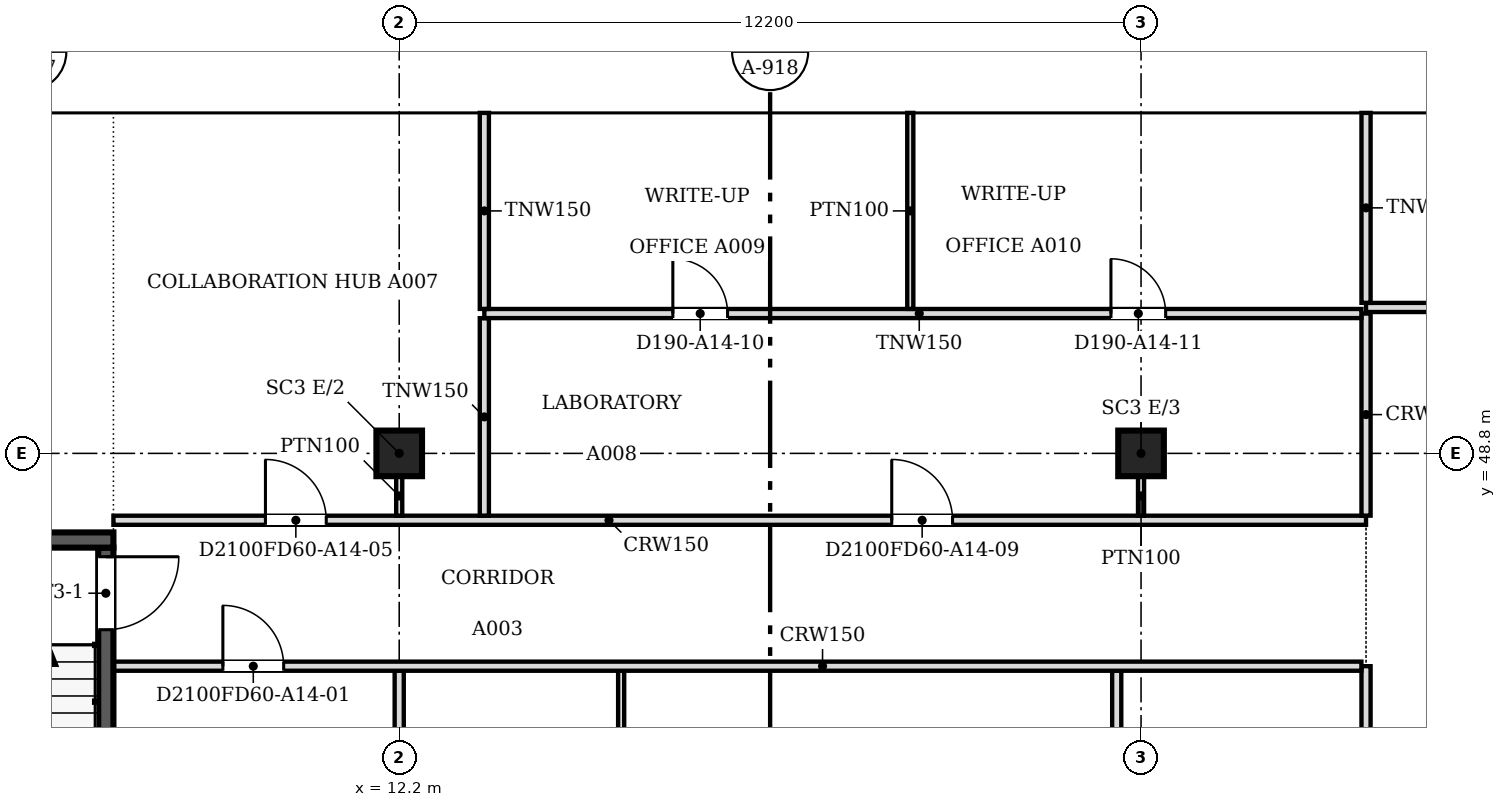
"""IFC4 building model, lengths in metres.
Left out: names, types, materials, properties, quantities, classifications, styles, units other than length and angle.
Written with IfcOpenShell. Run it as: python <this file> out.ifc"""

import sys

from ifc_helpers import new_model, si_unit, direction, frame, frame_2d, origin, origin_2d, place, context, subcontext, project, spatial, polyline, rectangle, outline, extrude, faceted_brep, source, transform, mapped, element, fill, save


model = new_model("IFC4")
c1 = context("Model", 3, precision=1e-05, world=origin(), true_north=direction((0.0, 1.0)))
c2 = subcontext(c1, "Body", "Model", "MODEL_VIEW")
j1 = project(units=[si_unit("LENGTHUNIT", "METRE"), si_unit("PLANEANGLEUNIT", "RADIAN")], contexts=[c1])
p1 = place(None, origin())
s1 = spatial("IfcSite", under=j1, at=p1, CompositionType="ELEMENT")
p2 = place(p1, origin())
s2 = spatial("IfcBuilding", under=s1, at=p2, CompositionType="ELEMENT")
p3 = place(p2, frame((0.0, 0.0, 159.2)))
s3 = spatial("IfcBuildingStorey", under=s2, at=p3, CompositionType="ELEMENT", Elevation=159.2)
for number, where, z_axis, x_axis in (
    (1, (12.2, 48.8, 0.0), (0.0, 0.0, 1.0), (1.0, 0.0, 0.0)),
    (2, (24.4, 48.8, 0.0), (0.0, 0.0, 1.0), (1.0, 0.0, 0.0)),
):
    element("IfcColumn", number, at=place(p3, frame(where, z_axis=z_axis, x_axis=x_axis)), inside=s3, PredefinedType="COLUMN", context=c2, shape_type="SweptSolid", body=[
        extrude(rectangle(XDim=0.75, YDim=0.75, at=origin_2d()), origin(), (0.0, 0.0, 1.0), 3.6),
    ])
m1 = source(origin(), c2, "Body", "SweptSolid", [
    extrude(outline(polyline([(3.05, 0.0), (6.1, 3.8), (3.05, 7.6), (0.0, 3.8), (3.05, 0.0)])), frame((0.0, 0.25, 0.0), z_axis=(0.0, -1.0, 0.0), x_axis=(1.0, 0.0, 0.0)), (0.0, 0.0, 1.0), 0.5),
])
p4 = place(p3, frame((30.5, 54.65, -3.8), z_axis=(0.0, 0.0, 1.0), x_axis=(-1.0, 0.0, 0.0)))
e3 = element("IfcWall", 3, at=p4, inside=s3, PredefinedType="SOLIDWALL", context=c2, shape_type="MappedRepresentation", body=[
    mapped(m1, transform((0.0, 0.0, 0.0), scale=1.0)),
])
m2 = source(origin(), c2, "Body", "SweptSolid", [
    extrude(outline(polyline([(3.05, 0.399), (5.78, 3.8), (3.05, 7.201), (0.321, 3.8), (3.05, 0.399)])), frame((0.0, 0.26, 0.0), z_axis=(0.0, -1.0, 0.0), x_axis=(1.0, 0.0, 0.0)), (0.0, 0.0, 1.0), 0.52),
])
p5 = place(p4, origin())
e4 = element("IfcOpeningElement", 4, at=p5, cuts=e3, PredefinedType="OPENING", context=c2, shape_type="MappedRepresentation", body=[
    mapped(m2, transform((0.0, 0.0, 0.0), scale=1.0)),
])
m3 = source(origin(), c2, "Body", "Brep", [
    faceted_brep([(3.05, -0.25, 0.0), (6.1, -0.25, 3.8), (6.1, -0.25, 3.8), (3.05, -0.25, 7.6), (0.0, -0.25, 3.8), (0.0, 0.25, 3.8), (3.05, 0.25, 7.6), (6.1, 0.25, 3.8), (6.1, 0.25, 3.8), (3.05, 0.25, 0.0)], [[[0, 1, 2, 3, 4]], [[5, 6, 7, 8, 9]], [[9, 8, 1, 0]], [[7, 6, 3, 2]], [[6, 5, 4, 3]], [[5, 9, 0, 4]], [[1, 8, 7, 2]]]),
])
p6 = place(p3, frame((24.4, 54.65, -3.8), z_axis=(0.0, 0.0, 1.0), x_axis=(-1.0, 0.0, 0.0)))
e5 = element("IfcWall", 5, at=p6, inside=s3, PredefinedType="SOLIDWALL", context=c2, shape_type="MappedRepresentation", body=[
    mapped(m3, transform((0.0, 0.0, 0.0), scale=1.0)),
])
p7 = place(p6, origin())
e6 = element("IfcOpeningElement", 6, at=p7, cuts=e5, PredefinedType="OPENING", context=c2, shape_type="MappedRepresentation", body=[
    mapped(m2, transform((0.0, 0.0, 0.0), scale=1.0)),
])
p8 = place(p3, frame((18.3, 54.65, -3.8), z_axis=(0.0, 0.0, 1.0), x_axis=(-1.0, 0.0, 0.0)))
e7 = element("IfcWall", 7, at=p8, inside=s3, PredefinedType="SOLIDWALL", context=c2, shape_type="MappedRepresentation", body=[
    mapped(m1, transform((0.0, 0.0, 0.0), scale=1.0)),
])
p9 = place(p8, origin())
e8 = element("IfcOpeningElement", 8, at=p9, cuts=e7, PredefinedType="OPENING", context=c2, shape_type="MappedRepresentation", body=[
    mapped(m2, transform((0.0, 0.0, 0.0), scale=1.0)),
])
m4 = source(origin(), c2, "Body", "Brep", [
    faceted_brep([(3.05, -0.25, 0.0), (6.053, -0.25, 3.8), (3.05, -0.25, 7.6), (0.0, -0.25, 3.8), (0.0, 0.25, 3.8), (3.05, 0.25, 7.6), (6.007, 0.25, 3.859), (6.007, 0.25, 3.741), (3.05, 0.25, 0.0), (6.053, 0.0, 3.8)], [[[0, 1, 2, 3]], [[4, 5, 6, 7, 8]], [[8, 7, 9, 1, 0]], [[6, 5, 2, 1, 9]], [[5, 4, 3, 2]], [[4, 8, 0, 3]], [[9, 7, 6]]]),
])
p10 = place(p3, frame((12.2, 54.65, -3.8), z_axis=(0.0, 0.0, 1.0), x_axis=(-1.0, 0.0, 0.0)))
e9 = element("IfcWall", 9, at=p10, inside=s3, PredefinedType="SOLIDWALL", context=c2, shape_type="MappedRepresentation", body=[
    mapped(m4, transform((0.0, 0.0, 0.0), scale=1.0)),
])
m5 = source(origin(), c2, "Body", "SweptSolid", [
    extrude(outline(polyline([(3.049, 0.401), (5.735, 3.8), (3.049, 7.199), (0.321, 3.8), (3.049, 0.401)])), frame((0.0, 0.26, 0.0), z_axis=(0.0, -1.0, 0.0), x_axis=(1.0, 0.0, 0.0)), (0.0, 0.0, 1.0), 0.52),
])
p11 = place(p10, origin())
e10 = element("IfcOpeningElement", 10, at=p11, cuts=e9, PredefinedType="OPENING", context=c2, shape_type="MappedRepresentation", body=[
    mapped(m5, transform((0.0, 0.0, 0.0), scale=1.0)),
])
p12 = place(p2, frame((0.0, 0.0, 163.0)))
s4 = spatial("IfcBuildingStorey", under=s2, at=p12, CompositionType="ELEMENT", Elevation=163.0)
p13 = place(p12, frame((33.55, 54.65, -3.8), z_axis=(0.0, 0.0, 1.0), x_axis=(-1.0, 0.0, 0.0)))
e11 = element("IfcWall", 11, at=p13, inside=s4, PredefinedType="SOLIDWALL", context=c2, shape_type="MappedRepresentation", body=[
    mapped(m1, transform((0.0, 0.0, 0.0), scale=1.0)),
])
p14 = place(p13, origin())
e12 = element("IfcOpeningElement", 12, at=p14, cuts=e11, PredefinedType="OPENING", context=c2, shape_type="MappedRepresentation", body=[
    mapped(m2, transform((0.0, 0.0, 0.0), scale=1.0)),
])
p15 = place(p12, frame((27.45, 54.65, -3.8), z_axis=(0.0, 0.0, 1.0), x_axis=(-1.0, 0.0, 0.0)))
e13 = element("IfcWall", 13, at=p15, inside=s4, PredefinedType="SOLIDWALL", context=c2, shape_type="MappedRepresentation", body=[
    mapped(m3, transform((0.0, 0.0, 0.0), scale=1.0)),
])
p16 = place(p15, origin())
e14 = element("IfcOpeningElement", 14, at=p16, cuts=e13, PredefinedType="OPENING", context=c2, shape_type="MappedRepresentation", body=[
    mapped(m2, transform((0.0, 0.0, 0.0), scale=1.0)),
])
p17 = place(p12, frame((21.35, 54.65, -3.8), z_axis=(0.0, 0.0, 1.0), x_axis=(-1.0, 0.0, 0.0)))
e15 = element("IfcWall", 15, at=p17, inside=s4, PredefinedType="SOLIDWALL", context=c2, shape_type="MappedRepresentation", body=[
    mapped(m1, transform((0.0, 0.0, 0.0), scale=1.0)),
])
p18 = place(p17, origin())
e16 = element("IfcOpeningElement", 16, at=p18, cuts=e15, PredefinedType="OPENING", context=c2, shape_type="MappedRepresentation", body=[
    mapped(m2, transform((0.0, 0.0, 0.0), scale=1.0)),
])
p19 = place(p12, frame((15.25, 54.65, -3.8), z_axis=(0.0, 0.0, 1.0), x_axis=(-1.0, 0.0, 0.0)))
e17 = element("IfcWall", 17, at=p19, inside=s4, PredefinedType="SOLIDWALL", context=c2, shape_type="MappedRepresentation", body=[
    mapped(m1, transform((0.0, 0.0, 0.0), scale=1.0)),
])
p20 = place(p19, origin())
e18 = element("IfcOpeningElement", 18, at=p20, cuts=e17, PredefinedType="OPENING", context=c2, shape_type="MappedRepresentation", body=[
    mapped(m2, transform((0.0, 0.0, 0.0), scale=1.0)),
])
m6 = source(origin(), c2, "Body", "Brep", [
    faceted_brep([(3.003, -0.25, 0.0), (3.05, -0.25, 0.06), (3.05, -0.25, 7.54), (3.003, -0.25, 7.6), (0.0, -0.25, 3.8), (0.0, 0.25, 3.8), (2.957, 0.25, 7.541), (2.957, 0.25, 0.059), (3.003, 0.0, 0.0), (3.003, 0.0, 7.6)], [[[0, 1, 2, 3, 4]], [[5, 6, 7]], [[1, 0, 8]], [[9, 3, 2]], [[6, 5, 4, 3, 9]], [[5, 7, 8, 0, 4]], [[1, 8, 7, 6, 9, 2]]]),
])
p21 = place(p12, frame((9.15, 54.65, -3.8), z_axis=(0.0, 0.0, 1.0), x_axis=(-1.0, 0.0, 0.0)))
e19 = element("IfcWall", 19, at=p21, inside=s4, PredefinedType="SOLIDWALL", context=c2, shape_type="MappedRepresentation", body=[
    mapped(m6, transform((0.0, 0.0, 0.0), scale=1.0)),
])
m7 = source(origin(), c2, "Body", "SweptSolid", [
    extrude(outline(polyline([(2.803, 6.944), (0.319, 3.8), (2.803, 0.656), (2.803, 6.944)])), frame((0.0, 0.26, 0.0), z_axis=(0.0, -1.0, 0.0), x_axis=(1.0, 0.0, 0.0)), (0.0, 0.0, 1.0), 0.52),
])
p22 = place(p21, origin())
e20 = element("IfcOpeningElement", 20, at=p22, cuts=e19, PredefinedType="OPENING", context=c2, shape_type="MappedRepresentation", body=[
    mapped(m7, transform((0.0, 0.0, 0.0), scale=1.0)),
])
p23 = place(p3, frame((3.6, 47.375, 0.0), z_axis=(0.0, 0.0, 1.0), x_axis=(1.0, 0.0, 0.0)))
e21 = element("IfcWall", 21, at=p23, inside=s3, PredefinedType="SOLIDWALL", context=c2, shape_type="SweptSolid", body=[
    extrude(rectangle(XDim=3.9, YDim=0.25, at=frame_2d((1.95, 0.0))), origin(), (0.0, 0.0, 1.0), 3.8),
])
p24 = place(p3, frame((7.375, 47.25, 0.0), z_axis=(0.0, 0.0, 1.0), x_axis=(0.0, -1.0, 0.0)))
e22 = element("IfcWall", 22, at=p24, inside=s3, PredefinedType="SOLIDWALL", context=c2, shape_type="SweptSolid", body=[
    extrude(rectangle(XDim=8.0, YDim=0.25, at=frame_2d((4.0, 0.0))), origin(), (0.0, 0.0, 1.0), 3.8),
])
m8 = source(origin(), c2, "Body", "SweptSolid", [
    extrude(rectangle(XDim=1.2, YDim=2.1, at=frame_2d((0.6, 1.05))), frame((0.0, 0.135, 0.0), z_axis=(0.0, -1.0, 0.0), x_axis=(1.0, 0.0, 0.0)), (0.0, 0.0, 1.0), 0.27),
])
p25 = place(p24, frame((0.15, 0.0, 0.0)))
e23 = element("IfcOpeningElement", 23, at=p25, cuts=e22, PredefinedType="OPENING", context=c2, shape_type="MappedRepresentation", body=[
    mapped(m8, transform((0.0, 0.0, 0.0), scale=1.0)),
])
p26 = place(p3, frame((28.1, 18.8, 0.0), z_axis=(0.0, 0.0, 1.0), x_axis=(0.0, 1.0, 0.0)))
e24 = element("IfcWall", 24, at=p26, inside=s3, PredefinedType="PARTITIONING", context=c2, shape_type="SweptSolid", body=[
    extrude(rectangle(XDim=26.5, YDim=0.15, at=frame_2d((13.25, 0.0))), origin(), (0.0, 0.0, 1.0), 3.067),
])
m9 = source(origin(), c2, "Body", "SweptSolid", [
    extrude(rectangle(XDim=0.9, YDim=2.1, at=frame_2d((0.45, 1.05))), frame((0.0, 0.085, 0.0), z_axis=(0.0, -1.0, 0.0), x_axis=(1.0, 0.0, 0.0)), (0.0, 0.0, 1.0), 0.17),
])
p27 = place(p26, frame((1.1, 0.0, 0.0)))
e25 = element("IfcOpeningElement", 25, at=p27, cuts=e24, PredefinedType="OPENING", context=c2, shape_type="MappedRepresentation", body=[
    mapped(m9, transform((0.0, 0.0, 0.0), scale=1.0)),
])
m10 = source(origin(), c2, "Body", "SweptSolid", [
    extrude(rectangle(XDim=1.0, YDim=2.1, at=frame_2d((0.5, 1.05))), frame((0.0, 0.085, 0.0), z_axis=(0.0, -1.0, 0.0), x_axis=(1.0, 0.0, 0.0)), (0.0, 0.0, 1.0), 0.17),
])
p28 = place(p26, frame((23.151, 0.0, 0.0)))
e26 = element("IfcOpeningElement", 26, at=p28, cuts=e24, PredefinedType="OPENING", context=c2, shape_type="MappedRepresentation", body=[
    mapped(m10, transform((0.0, 0.0, 0.0), scale=1.0)),
])
p29 = place(p26, frame((8.1, 0.0, 0.0)))
e27 = element("IfcOpeningElement", 27, at=p29, cuts=e24, PredefinedType="OPENING", context=c2, shape_type="MappedRepresentation", body=[
    mapped(m10, transform((0.0, 0.0, 0.0), scale=1.0)),
])
p30 = place(p26, frame((15.8, 0.0, 0.0)))
e28 = element("IfcOpeningElement", 28, at=p30, cuts=e24, PredefinedType="OPENING", context=c2, shape_type="MappedRepresentation", body=[
    mapped(m9, transform((0.0, 0.0, 0.0), scale=1.0)),
])
p31 = place(p3, frame((12.2, 36.976, 0.0), z_axis=(0.0, 0.0, 1.0), x_axis=(0.0, 1.0, 0.0)))
e29 = element("IfcWall", 29, at=p31, inside=s3, PredefinedType="PARTITIONING", context=c2, shape_type="SweptSolid", body=[
    extrude(rectangle(XDim=8.248, YDim=0.15, at=frame_2d((4.124, 0.0))), origin(), (0.0, 0.0, 1.0), 3.067),
])
p32 = place(p3, frame((15.85, 39.726, 0.0), z_axis=(0.0, 0.0, 1.0), x_axis=(0.0, 1.0, 0.0)))
e30 = element("IfcWall", 30, at=p32, inside=s3, PredefinedType="PARTITIONING", context=c2, shape_type="SweptSolid", body=[
    extrude(rectangle(XDim=5.498, YDim=0.1, at=frame_2d((2.749, 0.0))), origin(), (0.0, 0.0, 1.0), 3.067),
])
m11 = source(origin(), c2, "Body", "SweptSolid", [
    extrude(rectangle(XDim=0.9, YDim=2.1, at=frame_2d((0.45, 1.05))), frame((0.0, 0.06, 0.0), z_axis=(0.0, -1.0, 0.0), x_axis=(1.0, 0.0, 0.0)), (0.0, 0.0, 1.0), 0.12),
])
p33 = place(p32, frame((2.3, 0.0, 0.0)))
e31 = element("IfcOpeningElement", 31, at=p33, cuts=e30, PredefinedType="OPENING", context=c2, shape_type="MappedRepresentation", body=[
    mapped(m11, transform((0.0, 0.0, 0.0), scale=1.0)),
])
p34 = place(p3, frame((24.0, 39.726, 0.0), z_axis=(0.0, 0.0, 1.0), x_axis=(0.0, 1.0, 0.0)))
e32 = element("IfcWall", 32, at=p34, inside=s3, PredefinedType="PARTITIONING", context=c2, shape_type="SweptSolid", body=[
    extrude(rectangle(XDim=5.498, YDim=0.15, at=frame_2d((2.749, 0.0))), origin(), (0.0, 0.0, 1.0), 3.067),
])
p35 = place(p34, frame((2.3, 0.0, 0.0)))
e33 = element("IfcOpeningElement", 33, at=p35, cuts=e32, PredefinedType="OPENING", context=c2, shape_type="MappedRepresentation", body=[
    mapped(m9, transform((0.0, 0.0, 0.0), scale=1.0)),
])
p36 = place(p3, frame((28.024, 45.3, 0.0), z_axis=(0.0, 0.0, 1.0), x_axis=(-1.0, 0.0, 0.0)))
e34 = element("IfcWall", 34, at=p36, inside=s3, PredefinedType="PARTITIONING", context=c2, shape_type="SweptSolid", body=[
    extrude(rectangle(XDim=20.524, YDim=0.15, at=frame_2d((10.262, 0.0))), origin(), (0.0, 0.0, 1.0), 3.067),
])
p37 = place(p36, frame((17.724, 0.0, 0.0)))
e35 = element("IfcOpeningElement", 35, at=p37, cuts=e34, PredefinedType="OPENING", context=c2, shape_type="MappedRepresentation", body=[
    mapped(m10, transform((0.0, 0.0, 0.0), scale=1.0)),
])
p38 = place(p3, frame((7.5, 47.7, 0.0), z_axis=(0.0, 0.0, 1.0), x_axis=(1.0, 0.0, 0.0)))
e36 = element("IfcWall", 36, at=p38, inside=s3, PredefinedType="PARTITIONING", context=c2, shape_type="SweptSolid", body=[
    extrude(rectangle(XDim=20.6, YDim=0.15, at=frame_2d((10.3, 0.0))), origin(), (0.0, 0.0, 1.0), 3.067),
])
p39 = place(p38, frame((2.5, 0.0, 0.0)))
e37 = element("IfcOpeningElement", 37, at=p39, cuts=e36, PredefinedType="OPENING", context=c2, shape_type="MappedRepresentation", body=[
    mapped(m10, transform((0.0, 0.0, 0.0), scale=1.0)),
])
p40 = place(p38, frame((12.8, 0.0, 0.0)))
e38 = element("IfcOpeningElement", 38, at=p40, cuts=e36, PredefinedType="OPENING", context=c2, shape_type="MappedRepresentation", body=[
    mapped(m10, transform((0.0, 0.0, 0.0), scale=1.0)),
])
p41 = place(p3, frame((13.6, 47.776, 0.0), z_axis=(0.0, 0.0, 1.0), x_axis=(0.0, 1.0, 0.0)))
e39 = element("IfcWall", 39, at=p41, inside=s3, PredefinedType="PARTITIONING", context=c2, shape_type="SweptSolid", body=[
    extrude(rectangle(XDim=3.248, YDim=0.15, at=frame_2d((1.624, 0.0))), origin(), (0.0, 0.0, 1.0), 3.067),
])
p42 = place(p3, frame((28.1, 47.776, 0.0), z_axis=(0.0, 0.0, 1.0), x_axis=(0.0, 1.0, 0.0)))
e40 = element("IfcWall", 40, at=p42, inside=s3, PredefinedType="PARTITIONING", context=c2, shape_type="SweptSolid", body=[
    extrude(rectangle(XDim=3.324, YDim=0.15, at=frame_2d((1.662, 0.0))), origin(), (0.0, 0.0, 1.0), 3.067),
])
for number, where, z_axis, x_axis in (
    (41, (12.2, 48.425, 0.0), (0.0, 0.0, 1.0), (0.0, -1.0, 0.0)),
    (42, (24.4, 48.425, 0.0), (0.0, 0.0, 1.0), (0.0, -1.0, 0.0)),
):
    element("IfcWall", number, at=place(p3, frame(where, z_axis=z_axis, x_axis=x_axis)), inside=s3, PredefinedType="PARTITIONING", context=c2, shape_type="SweptSolid", body=[
        extrude(rectangle(XDim=0.65, YDim=0.1, at=frame_2d((0.325, 0.0))), origin(), (0.0, 0.0, 1.0), 3.067),
    ])
p43 = place(p3, frame((13.6, 51.1, 0.0), z_axis=(0.0, 0.0, 1.0), x_axis=(1.0, 0.0, 0.0)))
e43 = element("IfcWall", 43, at=p43, inside=s3, PredefinedType="PARTITIONING", context=c2, shape_type="SweptSolid", body=[
    extrude(rectangle(XDim=14.424, YDim=0.15, at=frame_2d((7.212, 0.0))), origin(), (0.0, 0.0, 1.0), 3.067),
])
p44 = place(p43, frame((3.1, 0.0, 0.0)))
e44 = element("IfcOpeningElement", 44, at=p44, cuts=e43, PredefinedType="OPENING", context=c2, shape_type="MappedRepresentation", body=[
    mapped(m9, transform((0.0, 0.0, 0.0), scale=1.0)),
])
p45 = place(p43, frame((10.305, 0.0, 0.0)))
e45 = element("IfcOpeningElement", 45, at=p45, cuts=e43, PredefinedType="OPENING", context=c2, shape_type="MappedRepresentation", body=[
    mapped(m9, transform((0.0, 0.0, 0.0), scale=1.0)),
])
p46 = place(p3, frame((13.6, 51.176, 0.0), z_axis=(0.0, 0.0, 1.0), x_axis=(0.0, 1.0, 0.0)))
e46 = element("IfcWall", 46, at=p46, inside=s3, PredefinedType="PARTITIONING", context=c2, shape_type="SweptSolid", body=[
    extrude(rectangle(XDim=3.224, YDim=0.15, at=frame_2d((1.612, 0.0))), origin(), (0.0, 0.0, 1.0), 3.067),
])
p47 = place(p3, frame((20.605, 51.176, 0.0), z_axis=(0.0, 0.0, 1.0), x_axis=(0.0, 1.0, 0.0)))
e47 = element("IfcWall", 47, at=p47, inside=s3, PredefinedType="PARTITIONING", context=c2, shape_type="SweptSolid", body=[
    extrude(rectangle(XDim=3.224, YDim=0.1, at=frame_2d((1.612, 0.0))), origin(), (0.0, 0.0, 1.0), 3.067),
])
p48 = place(p3, frame((28.1, 51.2, 0.0), z_axis=(0.0, 0.0, 1.0), x_axis=(1.0, 0.0, 0.0)))
e48 = element("IfcWall", 48, at=p48, inside=s3, PredefinedType="PARTITIONING", context=c2, shape_type="SweptSolid", body=[
    extrude(rectangle(XDim=31.438, YDim=0.15, at=frame_2d((15.719, 0.0))), origin(), (0.0, 0.0, 1.0), 3.067),
])
p49 = place(p48, frame((7.0, 0.0, 0.0)))
e49 = element("IfcOpeningElement", 49, at=p49, cuts=e48, PredefinedType="OPENING", context=c2, shape_type="MappedRepresentation", body=[
    mapped(m9, transform((0.0, 0.0, 0.0), scale=1.0)),
])
p50 = place(p48, frame((22.8, 0.0, 0.0)))
e50 = element("IfcOpeningElement", 50, at=p50, cuts=e48, PredefinedType="OPENING", context=c2, shape_type="MappedRepresentation", body=[
    mapped(m9, transform((0.0, 0.0, 0.0), scale=1.0)),
])
p51 = place(p3, frame((28.1, 51.276, 0.0), z_axis=(0.0, 0.0, 1.0), x_axis=(0.0, 1.0, 0.0)))
e51 = element("IfcWall", 51, at=p51, inside=s3, PredefinedType="PARTITIONING", context=c2, shape_type="SweptSolid", body=[
    extrude(rectangle(XDim=3.124, YDim=0.15, at=frame_2d((1.562, 0.0))), origin(), (0.0, 0.0, 1.0), 3.067),
])
m12 = source(origin(), c2, "Body", "SweptSolid", [
    extrude(rectangle(XDim=1.2, YDim=2.1, at=frame_2d((0.6, 1.05))), frame((0.0, 0.025, 0.0), z_axis=(0.0, -1.0, 0.0), x_axis=(1.0, 0.0, 0.0)), (0.0, 0.0, 1.0), 0.05),
])
p52 = place(p25, origin())
e52 = element("IfcDoor", 52, at=p52, inside=s3, OperationType="SINGLE_SWING_LEFT", PredefinedType="DOOR", context=c2, shape_type="MappedRepresentation", body=[
    mapped(m12, transform((0.0, 0.0, 0.0), scale=1.0)),
])
fill(e23, e52)
m13 = source(origin(), c2, "Body", "SweptSolid", [
    extrude(rectangle(XDim=1.0, YDim=2.1, at=frame_2d((0.5, 1.05))), frame((0.0, 0.025, 0.0), z_axis=(0.0, -1.0, 0.0), x_axis=(1.0, 0.0, 0.0)), (0.0, 0.0, 1.0), 0.05),
])
p53 = place(p37, origin())
e53 = element("IfcDoor", 53, at=p53, inside=s3, OperationType="SINGLE_SWING_RIGHT", PredefinedType="DOOR", context=c2, shape_type="MappedRepresentation", body=[
    mapped(m13, transform((0.0, 0.0, 0.0), scale=1.0)),
])
fill(e35, e53)
p54 = place(p39, origin())
e54 = element("IfcDoor", 54, at=p54, inside=s3, OperationType="SINGLE_SWING_LEFT", PredefinedType="DOOR", context=c2, shape_type="MappedRepresentation", body=[
    mapped(m13, transform((0.0, 0.0, 0.0), scale=1.0)),
])
fill(e37, e54)
m14 = source(origin(), c2, "Body", "SweptSolid", [
    extrude(rectangle(XDim=0.9, YDim=2.1, at=frame_2d((0.45, 1.05))), frame((0.0, 0.025, 0.0), z_axis=(0.0, -1.0, 0.0), x_axis=(1.0, 0.0, 0.0)), (0.0, 0.0, 1.0), 0.05),
])
p55 = place(p44, origin())
e55 = element("IfcDoor", 55, at=p55, inside=s3, OperationType="SINGLE_SWING_LEFT", PredefinedType="DOOR", context=c2, shape_type="MappedRepresentation", body=[
    mapped(m14, transform((0.0, 0.0, 0.0), scale=1.0)),
])
fill(e44, e55)
p56 = place(p45, origin())
e56 = element("IfcDoor", 56, at=p56, inside=s3, OperationType="SINGLE_SWING_LEFT", PredefinedType="DOOR", context=c2, shape_type="MappedRepresentation", body=[
    mapped(m14, transform((0.0, 0.0, 0.0), scale=1.0)),
])
fill(e45, e56)
p57 = place(p40, origin())
e57 = element("IfcDoor", 57, at=p57, inside=s3, OperationType="SINGLE_SWING_LEFT", PredefinedType="DOOR", context=c2, shape_type="MappedRepresentation", body=[
    mapped(m13, transform((0.0, 0.0, 0.0), scale=1.0)),
])
fill(e38, e57)
save(model, sys.argv[1])
